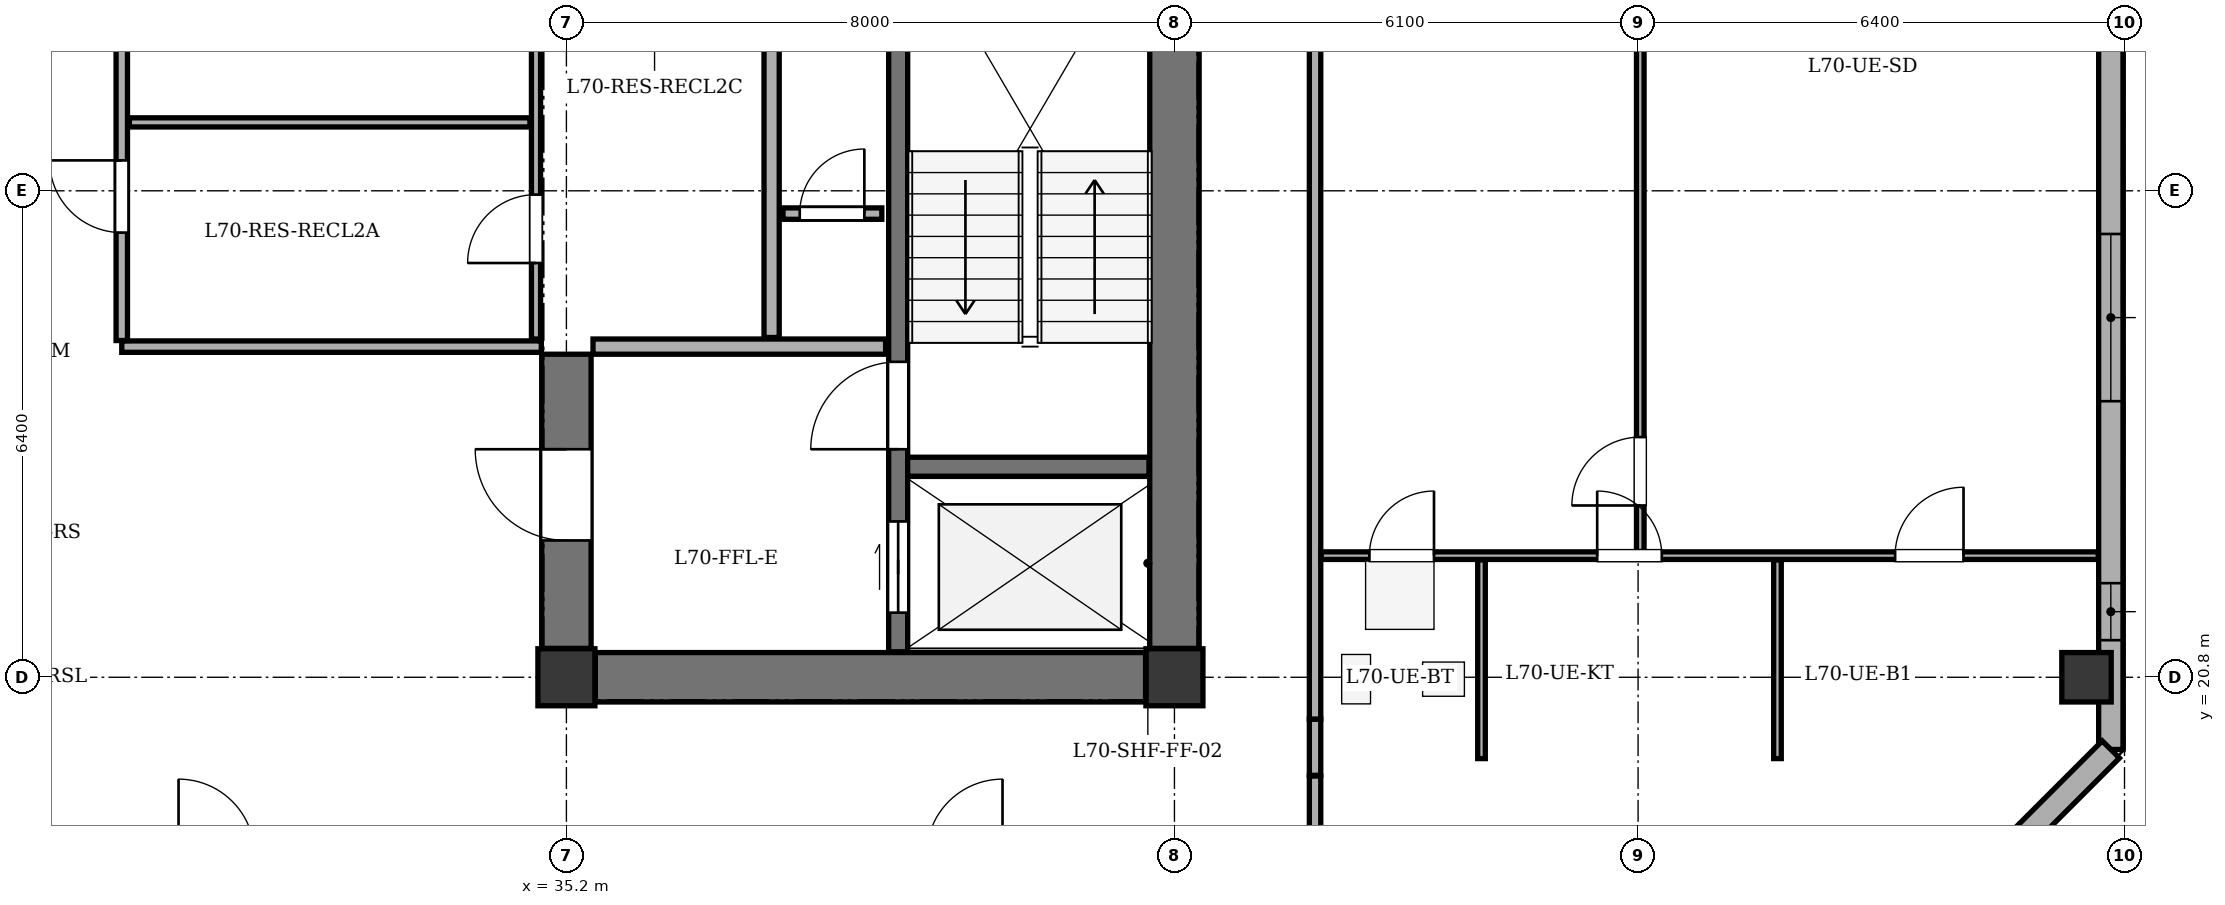
"""IFC4 building model, lengths in metres.
Left out: names, types, materials, properties, quantities, classifications, styles, units other than length and angle.
Written with IfcOpenShell. Run it as: python <this file> out.ifc"""

import sys

from ifc_helpers import new_model, si_unit, direction, frame, frame_2d, origin, origin_2d, place, context, subcontext, project, spatial, rectangle, extrude, element, fill, save


model = new_model("IFC4")
c1 = context("Model", 3, precision=1e-05, world=origin(), true_north=direction((0.0, 1.0)))
c2 = subcontext(c1, "Body", "Model", "MODEL_VIEW")
j1 = project(units=[si_unit("LENGTHUNIT", "METRE"), si_unit("PLANEANGLEUNIT", "RADIAN")], contexts=[c1])
p1 = place(None, origin())
s1 = spatial("IfcSite", under=j1, at=p1, CompositionType="ELEMENT")
p2 = place(p1, origin())
s2 = spatial("IfcBuilding", under=s1, at=p2, CompositionType="ELEMENT")
p3 = place(p2, frame((0.0, 0.0, 265.3)))
s3 = spatial("IfcBuildingStorey", under=s2, at=p3, CompositionType="ELEMENT", Elevation=265.3)
for number, where, z_axis, x_axis in (
    (1, (35.2, 20.8, 0.0), (0.0, 0.0, 1.0), (1.0, 0.0, 0.0)),
    (2, (43.2, 20.8, 0.0), (0.0, 0.0, 1.0), (1.0, 0.0, 0.0)),
):
    element("IfcColumn", number, at=place(p3, frame(where, z_axis=z_axis, x_axis=x_axis)), inside=s3, PredefinedType="COLUMN", context=c2, shape_type="SweptSolid", body=[
        extrude(rectangle(XDim=0.75, YDim=0.75, at=origin_2d()), origin(), (0.0, 0.0, 1.0), 3.4),
    ])
p4 = place(p3, frame((55.2, 20.8, 0.0), z_axis=(0.0, 0.0, 1.0), x_axis=(1.0, 0.0, 0.0)))
e3 = element("IfcColumn", 3, at=p4, inside=s3, PredefinedType="COLUMN", context=c2, shape_type="SweptSolid", body=[
    extrude(rectangle(XDim=0.65, YDim=0.65, at=origin_2d()), origin(), (0.0, 0.0, 1.0), 3.4),
])
p5 = place(p3, frame((55.52, 41.1, 0.0), z_axis=(0.0, 0.0, 1.0), x_axis=(0.0, -1.0, 0.0)))
e4 = element("IfcWall", 4, at=p5, inside=s3, PredefinedType="STANDARD", context=c2, shape_type="SweptSolid", body=[
    extrude(rectangle(XDim=21.25, YDim=0.32, at=frame_2d((10.625, 0.0))), origin(), (0.0, 0.0, 1.0), 2.335),
])
p6 = place(p5, frame((1.493, 0.0, 0.75)))
e5 = element("IfcOpeningElement", 5, at=p6, cuts=e4, PredefinedType="OPENING", context=c2, shape_type="SweptSolid", body=[
    extrude(rectangle(XDim=1.8, YDim=1.465, at=frame_2d((0.9, 0.732))), frame((0.0, 0.17, 0.0), z_axis=(0.0, -1.0, 0.0), x_axis=(1.0, 0.0, 0.0)), (0.0, 0.0, 1.0), 0.34),
])
p7 = place(p5, frame((4.432, 0.0, 0.75)))
e6 = element("IfcOpeningElement", 6, at=p7, cuts=e4, PredefinedType="OPENING", context=c2, shape_type="SweptSolid", body=[
    extrude(rectangle(XDim=1.8, YDim=1.465, at=frame_2d((0.9, 0.732))), frame((0.0, 0.17, 0.0), z_axis=(0.0, -1.0, 0.0), x_axis=(1.0, 0.0, 0.0)), (0.0, 0.0, 1.0), 0.34),
])
p8 = place(p5, frame((9.807, 0.0, 0.75)))
e7 = element("IfcOpeningElement", 7, at=p8, cuts=e4, PredefinedType="OPENING", context=c2, shape_type="SweptSolid", body=[
    extrude(rectangle(XDim=1.8, YDim=1.465, at=frame_2d((0.9, 0.732))), frame((0.0, 0.17, 0.0), z_axis=(0.0, -1.0, 0.0), x_axis=(1.0, 0.0, 0.0)), (0.0, 0.0, 1.0), 0.34),
])
p9 = place(p5, frame((14.468, 0.0, 0.75)))
e8 = element("IfcOpeningElement", 8, at=p9, cuts=e4, PredefinedType="OPENING", context=c2, shape_type="SweptSolid", body=[
    extrude(rectangle(XDim=2.2, YDim=1.465, at=frame_2d((1.1, 0.732))), frame((0.0, 0.17, 0.0), z_axis=(0.0, -1.0, 0.0), x_axis=(1.0, 0.0, 0.0)), (0.0, 0.0, 1.0), 0.34),
])
p10 = place(p5, frame((19.062, 0.0, 0.75)))
e9 = element("IfcOpeningElement", 9, at=p10, cuts=e4, PredefinedType="OPENING", context=c2, shape_type="SweptSolid", body=[
    extrude(rectangle(XDim=0.75, YDim=1.45, at=frame_2d((0.375, 0.725))), frame((0.0, 0.17, 0.0), z_axis=(0.0, -1.0, 0.0), x_axis=(1.0, 0.0, 0.0)), (0.0, 0.0, 1.0), 0.34),
])
p11 = place(p3, frame((55.52, 19.85, 0.0), z_axis=(0.0, 0.0, 1.0), x_axis=(-0.707106781187, -0.707106781187, 0.0)))
e10 = element("IfcWall", 10, at=p11, inside=s3, PredefinedType="STANDARD", context=c2, shape_type="SweptSolid", body=[
    extrude(rectangle(XDim=5.402, YDim=0.32, at=frame_2d((2.701, 0.0))), origin(), (0.0, 0.0, 1.0), 2.335),
])
p12 = place(p11, frame((2.001, 0.0, 0.75)))
e11 = element("IfcOpeningElement", 11, at=p12, cuts=e10, PredefinedType="OPENING", context=c2, shape_type="SweptSolid", body=[
    extrude(rectangle(XDim=1.4, YDim=1.465, at=frame_2d((0.7, 0.732))), frame((0.0, 0.17, 0.0), z_axis=(0.0, -1.0, 0.0), x_axis=(1.0, 0.0, 0.0)), (0.0, 0.0, 1.0), 0.34),
])
p13 = place(p3, frame((43.2, 21.18, 0.0), z_axis=(0.0, 0.0, 1.0), x_axis=(0.0, 1.0, 0.0)))
e12 = element("IfcWall", 12, at=p13, inside=s3, PredefinedType="SHEAR", context=c2, shape_type="SweptSolid", body=[
    extrude(rectangle(XDim=12.04, YDim=0.65, at=frame_2d((6.02, 0.0))), origin(), (0.0, 0.0, 1.0), 2.95),
])
p14 = place(p3, frame((35.58, 20.8, 0.0), z_axis=(0.0, 0.0, 1.0), x_axis=(1.0, 0.0, 0.0)))
e13 = element("IfcWall", 13, at=p14, inside=s3, PredefinedType="SHEAR", context=c2, shape_type="SweptSolid", body=[
    extrude(rectangle(XDim=7.24, YDim=0.65, at=frame_2d((3.62, 0.0))), origin(), (0.0, 0.0, 1.0), 2.95),
])
p15 = place(p3, frame((35.2, 21.18, 0.0), z_axis=(0.0, 0.0, 1.0), x_axis=(0.0, 1.0, 0.0)))
e14 = element("IfcWall", 14, at=p15, inside=s3, PredefinedType="SHEAR", context=c2, shape_type="SweptSolid", body=[
    extrude(rectangle(XDim=3.87, YDim=0.65, at=frame_2d((1.935, 0.0))), origin(), (0.0, 0.0, 1.0), 2.95),
])
p16 = place(p15, frame((1.42, 0.0, 0.0)))
e15 = element("IfcOpeningElement", 15, at=p16, cuts=e14, PredefinedType="OPENING", context=c2, shape_type="SweptSolid", body=[
    extrude(rectangle(XDim=1.2, YDim=2.15, at=frame_2d((0.6, 1.075))), frame((0.0, 0.335, 0.0), z_axis=(0.0, -1.0, 0.0), x_axis=(1.0, 0.0, 0.0)), (0.0, 0.0, 1.0), 0.67),
])
p17 = place(p3, frame((39.565, 21.135, 0.0), z_axis=(0.0, 0.0, 1.0), x_axis=(0.0, 1.0, 0.0)))
e16 = element("IfcWall", 16, at=p17, inside=s3, PredefinedType="SHEAR", context=c2, shape_type="SweptSolid", body=[
    extrude(rectangle(XDim=12.13, YDim=0.25, at=frame_2d((6.065, 0.0))), origin(), (0.0, 0.0, 1.0), 2.95),
])
p18 = place(p17, frame((0.515, 0.0, 0.0)))
e17 = element("IfcOpeningElement", 17, at=p18, cuts=e16, PredefinedType="OPENING", context=c2, shape_type="SweptSolid", body=[
    extrude(rectangle(XDim=1.2, YDim=2.15, at=frame_2d((0.6, 1.075))), frame((0.0, 0.135, 0.0), z_axis=(0.0, -1.0, 0.0), x_axis=(1.0, 0.0, 0.0)), (0.0, 0.0, 1.0), 0.27),
])
p19 = place(p17, frame((2.665, 0.0, 0.0)))
e18 = element("IfcOpeningElement", 18, at=p19, cuts=e16, PredefinedType="OPENING", context=c2, shape_type="SweptSolid", body=[
    extrude(rectangle(XDim=1.15, YDim=2.15, at=frame_2d((0.575, 1.075))), frame((0.0, 0.135, 0.0), z_axis=(0.0, -1.0, 0.0), x_axis=(1.0, 0.0, 0.0)), (0.0, 0.0, 1.0), 0.27),
])
p20 = place(p3, frame((39.69, 23.57, 0.0), z_axis=(0.0, 0.0, 1.0), x_axis=(1.0, 0.0, 0.0)))
e19 = element("IfcWall", 19, at=p20, inside=s3, PredefinedType="SHEAR", context=c2, shape_type="SweptSolid", body=[
    extrude(rectangle(XDim=3.175, YDim=0.25, at=frame_2d((1.587, 0.0))), origin(), (0.0, 0.0, 1.0), 2.95),
])
p21 = place(p3, frame((35.55, 25.15, 0.0), z_axis=(0.0, 0.0, 1.0), x_axis=(1.0, 0.0, 0.0)))
e20 = element("IfcWall", 20, at=p21, inside=s3, PredefinedType="SOLIDWALL", context=c2, shape_type="SweptSolid", body=[
    extrude(rectangle(XDim=3.85, YDim=0.2, at=frame_2d((1.925, 0.0))), origin(), (0.0, 0.0, 1.0), 2.95),
])
p22 = place(p3, frame((37.9, 25.27, 0.0), z_axis=(0.0, 0.0, 1.0), x_axis=(0.0, 1.0, 0.0)))
e21 = element("IfcWall", 21, at=p22, inside=s3, PredefinedType="SOLIDWALL", context=c2, shape_type="SweptSolid", body=[
    extrude(rectangle(XDim=7.995, YDim=0.2, at=frame_2d((3.998, 0.0))), origin(), (0.0, 0.0, 1.0), 2.95),
])
p23 = place(p3, frame((38.05, 26.9, 0.0), z_axis=(0.0, 0.0, 1.0), x_axis=(1.0, 0.0, 0.0)))
e22 = element("IfcWall", 22, at=p23, inside=s3, PredefinedType="PARTITIONING", context=c2, shape_type="SweptSolid", body=[
    extrude(rectangle(XDim=1.3, YDim=0.15, at=frame_2d((0.65, 0.0))), origin(), (0.0, 0.0, 1.0), 2.95),
])
p24 = place(p23, frame((0.22, 0.0, 0.0)))
e23 = element("IfcOpeningElement", 23, at=p24, cuts=e22, PredefinedType="OPENING", context=c2, shape_type="SweptSolid", body=[
    extrude(rectangle(XDim=0.85, YDim=2.02, at=frame_2d((0.425, 1.01))), frame((0.0, 0.085, 0.0), z_axis=(0.0, -1.0, 0.0), x_axis=(1.0, 0.0, 0.0)), (0.0, 0.0, 1.0), 0.17),
])
p25 = place(p3, frame((29.35, 25.15, 0.0), z_axis=(0.0, 0.0, 1.0), x_axis=(1.0, 0.0, 0.0)))
e24 = element("IfcWall", 24, at=p25, inside=s3, PredefinedType="PARTITIONING", context=c2, shape_type="SweptSolid", body=[
    extrude(rectangle(XDim=5.52, YDim=0.15, at=frame_2d((2.76, 0.0))), origin(), (0.0, 0.0, 1.0), 2.95),
])
p26 = place(p3, frame((29.35, 25.23, 0.0), z_axis=(0.0, 0.0, 1.0), x_axis=(0.0, 1.0, 0.0)))
e25 = element("IfcWall", 25, at=p26, inside=s3, PredefinedType="PARTITIONING", context=c2, shape_type="SweptSolid", body=[
    extrude(rectangle(XDim=5.82, YDim=0.15, at=frame_2d((2.91, 0.0))), origin(), (0.0, 0.0, 1.0), 2.95),
])
p27 = place(p26, frame((1.42, 0.0, 0.0)))
e26 = element("IfcOpeningElement", 26, at=p27, cuts=e25, PredefinedType="OPENING", context=c2, shape_type="SweptSolid", body=[
    extrude(rectangle(XDim=0.95, YDim=2.1, at=frame_2d((0.475, 1.05))), frame((0.0, 0.085, 0.0), z_axis=(0.0, -1.0, 0.0), x_axis=(1.0, 0.0, 0.0)), (0.0, 0.0, 1.0), 0.17),
])
p28 = place(p26, frame((4.32, 0.0, 0.0)))
e27 = element("IfcOpeningElement", 27, at=p28, cuts=e25, PredefinedType="OPENING", context=c2, shape_type="SweptSolid", body=[
    extrude(rectangle(XDim=0.95, YDim=2.1, at=frame_2d((0.475, 1.05))), frame((0.0, 0.085, 0.0), z_axis=(0.0, -1.0, 0.0), x_axis=(1.0, 0.0, 0.0)), (0.0, 0.0, 1.0), 0.17),
])
p29 = place(p3, frame((34.8, 25.25, 0.0), z_axis=(0.0, 0.0, 1.0), x_axis=(0.0, 1.0, 0.0)))
e28 = element("IfcWall", 28, at=p29, inside=s3, PredefinedType="PARTITIONING", context=c2, shape_type="SweptSolid", body=[
    extrude(rectangle(XDim=5.6, YDim=0.12, at=frame_2d((2.8, 0.0))), origin(), (0.0, 0.0, 1.0), 2.95),
])
p30 = place(p29, frame((1.0, 0.0, 0.0)))
e29 = element("IfcOpeningElement", 29, at=p30, cuts=e28, PredefinedType="OPENING", context=c2, shape_type="SweptSolid", body=[
    extrude(rectangle(XDim=0.9, YDim=2.05, at=frame_2d((0.45, 1.025))), frame((0.0, 0.07, 0.0), z_axis=(0.0, -1.0, 0.0), x_axis=(1.0, 0.0, 0.0)), (0.0, 0.0, 1.0), 0.14),
])
p31 = place(p3, frame((29.45, 28.1, 0.0), z_axis=(0.0, 0.0, 1.0), x_axis=(1.0, 0.0, 0.0)))
e30 = element("IfcWall", 30, at=p31, inside=s3, PredefinedType="PARTITIONING", context=c2, shape_type="SweptSolid", body=[
    extrude(rectangle(XDim=5.27, YDim=0.12, at=frame_2d((2.635, 0.0))), origin(), (0.0, 0.0, 1.0), 2.95),
])
p32 = place(p3, frame((45.05, 19.5, 0.0), z_axis=(0.0, 0.0, 1.0), x_axis=(0.0, -1.0, 0.0)))
e31 = element("IfcWall", 31, at=p32, inside=s3, PredefinedType="PARTITIONING", context=c2, shape_type="SweptSolid", body=[
    extrude(rectangle(XDim=0.96, YDim=0.15, at=frame_2d((0.48, 0.0))), origin(), (0.0, 0.0, 1.0), 2.135),
])
p33 = place(p3, frame((45.05, 19.51, 0.0), z_axis=(0.0, 0.0, 1.0), x_axis=(0.0, 1.0, 0.0)))
e32 = element("IfcWall", 32, at=p33, inside=s3, PredefinedType="PARTITIONING", context=c2, shape_type="SweptSolid", body=[
    extrude(rectangle(XDim=0.74, YDim=0.15, at=frame_2d((0.37, 0.0))), origin(), (0.0, 0.0, 1.0), 2.135),
])
p34 = place(p3, frame((45.05, 20.25, 0.0), z_axis=(0.0, 0.0, 1.0), x_axis=(0.0, 1.0, 0.0)))
e33 = element("IfcWall", 33, at=p34, inside=s3, PredefinedType="PARTITIONING", context=c2, shape_type="SweptSolid", body=[
    extrude(rectangle(XDim=13.9, YDim=0.15, at=frame_2d((6.95, 0.0))), origin(), (0.0, 0.0, 1.0), 2.135),
])
p35 = place(p3, frame((45.13, 22.4, 0.0), z_axis=(0.0, 0.0, 1.0), x_axis=(1.0, 0.0, 0.0)))
e34 = element("IfcWall", 34, at=p35, inside=s3, PredefinedType="PARTITIONING", context=c2, shape_type="SweptSolid", body=[
    extrude(rectangle(XDim=10.225, YDim=0.1, at=frame_2d((5.113, 0.0))), origin(), (0.0, 0.0, 1.0), 2.95),
])
p36 = place(p35, frame((0.635, 0.0, 0.0)))
e35 = element("IfcOpeningElement", 35, at=p36, cuts=e34, PredefinedType="OPENING", context=c2, shape_type="SweptSolid", body=[
    extrude(rectangle(XDim=0.85, YDim=2.05, at=frame_2d((0.425, 1.025))), frame((0.0, 0.06, 0.0), z_axis=(0.0, -1.0, 0.0), x_axis=(1.0, 0.0, 0.0)), (0.0, 0.0, 1.0), 0.12),
])
p37 = place(p35, frame((3.632, 0.0, 0.0)))
e36 = element("IfcOpeningElement", 36, at=p37, cuts=e34, PredefinedType="OPENING", context=c2, shape_type="SweptSolid", body=[
    extrude(rectangle(XDim=0.85, YDim=2.05, at=frame_2d((0.425, 1.025))), frame((0.0, 0.06, 0.0), z_axis=(0.0, -1.0, 0.0), x_axis=(1.0, 0.0, 0.0)), (0.0, 0.0, 1.0), 0.12),
])
p38 = place(p35, frame((7.552, 0.0, 0.0)))
e37 = element("IfcOpeningElement", 37, at=p38, cuts=e34, PredefinedType="OPENING", context=c2, shape_type="SweptSolid", body=[
    extrude(rectangle(XDim=0.9, YDim=2.05, at=frame_2d((0.45, 1.025))), frame((0.0, 0.06, 0.0), z_axis=(0.0, -1.0, 0.0), x_axis=(1.0, 0.0, 0.0)), (0.0, 0.0, 1.0), 0.12),
])
p39 = place(p3, frame((49.329, 22.455, 0.0), z_axis=(0.0, 0.0, 1.0), x_axis=(0.0, 1.0, 0.0)))
e38 = element("IfcWall", 38, at=p39, inside=s3, PredefinedType="PARTITIONING", context=c2, shape_type="SweptSolid", body=[
    extrude(rectangle(XDim=18.765, YDim=0.1, at=frame_2d((9.382, 0.0))), origin(), (0.0, 0.0, 1.0), 2.95),
])
p40 = place(p39, frame((0.605, 0.0, 0.0)))
e39 = element("IfcOpeningElement", 39, at=p40, cuts=e38, PredefinedType="OPENING", context=c2, shape_type="SweptSolid", body=[
    extrude(rectangle(XDim=0.9, YDim=2.05, at=frame_2d((0.45, 1.025))), frame((0.0, 0.06, 0.0), z_axis=(0.0, -1.0, 0.0), x_axis=(1.0, 0.0, 0.0)), (0.0, 0.0, 1.0), 0.12),
])
for number, where, z_axis, x_axis in (
    (40, (47.24, 19.73, 0.0), (0.0, 0.0, 1.0), (0.0, 1.0, 0.0)),
    (41, (51.134, 19.73, 0.0), (0.0, 0.0, 1.0), (0.0, 1.0, 0.0)),
):
    element("IfcWall", number, at=place(p3, frame(where, z_axis=z_axis, x_axis=x_axis)), inside=s3, PredefinedType="PARTITIONING", context=c2, shape_type="SweptSolid", body=[
        extrude(rectangle(XDim=2.615, YDim=0.1, at=frame_2d((1.308, 0.0))), origin(), (0.0, 0.0, 1.0), 2.95),
    ])
p41 = place(p9, origin())
e42 = element("IfcWindow", 42, at=p41, inside=s3, PartitioningType="SINGLE_PANEL", PredefinedType="WINDOW", context=c2, shape_type="SweptSolid", body=[
    extrude(rectangle(XDim=2.2, YDim=1.465, at=frame_2d((1.1, 0.732))), frame((0.0, -0.01, 0.0), z_axis=(0.0, -1.0, 0.0), x_axis=(1.0, 0.0, 0.0)), (0.0, 0.0, 1.0), 0.06),
])
fill(e8, e42)
p42 = place(p10, origin())
e43 = element("IfcWindow", 43, at=p42, inside=s3, PartitioningType="SINGLE_PANEL", PredefinedType="WINDOW", context=c2, shape_type="SweptSolid", body=[
    extrude(rectangle(XDim=0.75, YDim=1.45, at=frame_2d((0.375, 0.725))), frame((0.0, -0.01, 0.0), z_axis=(0.0, -1.0, 0.0), x_axis=(1.0, 0.0, 0.0)), (0.0, 0.0, 1.0), 0.06),
])
fill(e9, e43)
p43 = place(p16, origin())
e44 = element("IfcDoor", 44, at=p43, inside=s3, OperationType="SINGLE_SWING_RIGHT", PredefinedType="DOOR", context=c2, shape_type="SweptSolid", body=[
    extrude(rectangle(XDim=1.2, YDim=2.15, at=frame_2d((0.6, 1.075))), frame((0.0, 0.025, 0.0), z_axis=(0.0, -1.0, 0.0), x_axis=(1.0, 0.0, 0.0)), (0.0, 0.0, 1.0), 0.05),
])
fill(e15, e44)
p44 = place(p18, origin())
e45 = element("IfcDoor", 45, at=p44, inside=s3, OperationType="DOUBLE_DOOR_SLIDING", PredefinedType="DOOR", context=c2, shape_type="SweptSolid", body=[
    extrude(rectangle(XDim=1.2, YDim=2.15, at=frame_2d((0.6, 1.075))), frame((0.0, 0.025, 0.0), z_axis=(0.0, -1.0, 0.0), x_axis=(1.0, 0.0, 0.0)), (0.0, 0.0, 1.0), 0.05),
])
fill(e17, e45)
p45 = place(p19, origin())
e46 = element("IfcDoor", 46, at=p45, inside=s3, OperationType="SINGLE_SWING_LEFT", PredefinedType="DOOR", context=c2, shape_type="SweptSolid", body=[
    extrude(rectangle(XDim=1.15, YDim=2.15, at=frame_2d((0.575, 1.075))), frame((0.0, 0.025, 0.0), z_axis=(0.0, -1.0, 0.0), x_axis=(1.0, 0.0, 0.0)), (0.0, 0.0, 1.0), 0.05),
])
fill(e18, e46)
p46 = place(p24, origin())
e47 = element("IfcDoor", 47, at=p46, inside=s3, OperationType="SINGLE_SWING_RIGHT", PredefinedType="DOOR", context=c2, shape_type="SweptSolid", body=[
    extrude(rectangle(XDim=0.85, YDim=2.02, at=frame_2d((0.425, 1.01))), frame((0.0, 0.025, 0.0), z_axis=(0.0, -1.0, 0.0), x_axis=(1.0, 0.0, 0.0)), (0.0, 0.0, 1.0), 0.05),
])
fill(e23, e47)
p47 = place(p30, origin())
e48 = element("IfcDoor", 48, at=p47, inside=s3, OperationType="SINGLE_SWING_LEFT", PredefinedType="DOOR", context=c2, shape_type="SweptSolid", body=[
    extrude(rectangle(XDim=0.9, YDim=2.05, at=frame_2d((0.45, 1.025))), frame((0.0, 0.025, 0.0), z_axis=(0.0, -1.0, 0.0), x_axis=(1.0, 0.0, 0.0)), (0.0, 0.0, 1.0), 0.05),
])
fill(e29, e48)
p48 = place(p27, origin())
e49 = element("IfcDoor", 49, at=p48, inside=s3, OperationType="SINGLE_SWING_RIGHT", PredefinedType="DOOR", context=c2, shape_type="SweptSolid", body=[
    extrude(rectangle(XDim=0.95, YDim=2.1, at=frame_2d((0.475, 1.05))), frame((0.0, 0.025, 0.0), z_axis=(0.0, -1.0, 0.0), x_axis=(1.0, 0.0, 0.0)), (0.0, 0.0, 1.0), 0.05),
])
fill(e26, e49)
p49 = place(p40, origin())
e50 = element("IfcDoor", 50, at=p49, inside=s3, OperationType="SINGLE_SWING_LEFT", PredefinedType="DOOR", context=c2, shape_type="SweptSolid", body=[
    extrude(rectangle(XDim=0.9, YDim=2.05, at=frame_2d((0.45, 1.025))), frame((0.0, 0.025, 0.0), z_axis=(0.0, -1.0, 0.0), x_axis=(1.0, 0.0, 0.0)), (0.0, 0.0, 1.0), 0.05),
])
fill(e39, e50)
p50 = place(p36, origin())
e51 = element("IfcDoor", 51, at=p50, inside=s3, OperationType="SINGLE_SWING_RIGHT", PredefinedType="DOOR", context=c2, shape_type="SweptSolid", body=[
    extrude(rectangle(XDim=0.85, YDim=2.05, at=frame_2d((0.425, 1.025))), frame((0.0, 0.025, 0.0), z_axis=(0.0, -1.0, 0.0), x_axis=(1.0, 0.0, 0.0)), (0.0, 0.0, 1.0), 0.05),
])
fill(e35, e51)
p51 = place(p37, origin())
e52 = element("IfcDoor", 52, at=p51, inside=s3, OperationType="SINGLE_SWING_LEFT", PredefinedType="DOOR", context=c2, shape_type="SweptSolid", body=[
    extrude(rectangle(XDim=0.85, YDim=2.05, at=frame_2d((0.425, 1.025))), frame((0.0, 0.025, 0.0), z_axis=(0.0, -1.0, 0.0), x_axis=(1.0, 0.0, 0.0)), (0.0, 0.0, 1.0), 0.05),
])
fill(e36, e52)
p52 = place(p38, origin())
e53 = element("IfcDoor", 53, at=p52, inside=s3, OperationType="SINGLE_SWING_RIGHT", PredefinedType="DOOR", context=c2, shape_type="SweptSolid", body=[
    extrude(rectangle(XDim=0.9, YDim=2.05, at=frame_2d((0.45, 1.025))), frame((0.0, 0.025, 0.0), z_axis=(0.0, -1.0, 0.0), x_axis=(1.0, 0.0, 0.0)), (0.0, 0.0, 1.0), 0.05),
])
fill(e37, e53)
save(model, sys.argv[1])
